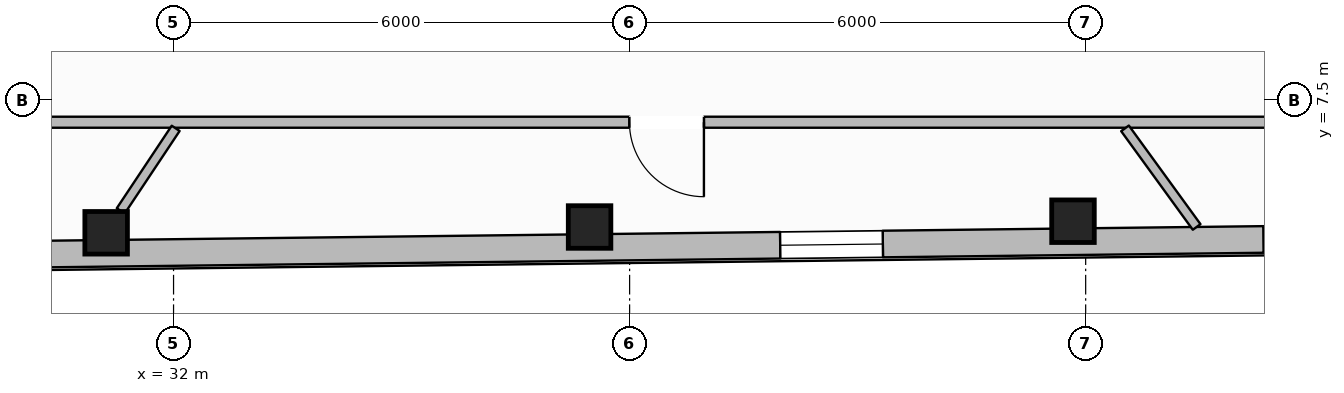
"""IFC4 building model, lengths in metres.
Left out: names, types, materials, properties, quantities, classifications, styles, units other than length and angle.
Written with IfcOpenShell. Run it as: python <this file> out.ifc"""

import sys

from ifc_helpers import new_model, si_unit, direction, frame, frame_2d, origin, origin_2d, place, context, subcontext, project, spatial, rectangle, hollow_rectangle, extrude, element, fill, save


model = new_model("IFC4")
c1 = context("Model", 3, precision=1e-05, world=origin(), true_north=direction((0.0, 1.0)))
c2 = subcontext(c1, "Body", "Model", "MODEL_VIEW")
j1 = project(units=[si_unit("LENGTHUNIT", "METRE"), si_unit("PLANEANGLEUNIT", "RADIAN")], contexts=[c1])
p1 = place(None, origin())
s1 = spatial("IfcSite", under=j1, at=p1, CompositionType="ELEMENT")
p2 = place(p1, origin())
s2 = spatial("IfcBuilding", under=s1, at=p2, CompositionType="ELEMENT")
p3 = place(p2, frame((0.0, 0.0, 289.55)))
s3 = spatial("IfcBuildingStorey", under=s2, at=p3, CompositionType="ELEMENT", Elevation=289.55)
for number, where, z_axis, x_axis in (
    (1, (31.113, 5.755, 0.0), (0.0, 0.0, 1.0), (1.0, 0.0, 0.0)),
    (2, (37.473, 5.832, 0.0), (0.0, 0.0, 1.0), (1.0, 0.0, 0.0)),
    (3, (43.833, 5.908, 0.0), (0.0, 0.0, 1.0), (1.0, 0.0, 0.0)),
):
    element("IfcColumn", number, at=place(p3, frame(where, z_axis=z_axis, x_axis=x_axis)), inside=s3, PredefinedType="COLUMN", context=c2, shape_type="SweptSolid", body=[
        extrude(hollow_rectangle(XDim=0.56, YDim=0.56, WallThickness=0.025, at=origin_2d()), origin(), (0.0, 0.0, 1.0), 3.61),
    ])
p4 = place(p3, frame((57.028, 5.796, 0.0), z_axis=(0.0, 0.0, 1.0), x_axis=(-0.999928125145, -0.011989351295, 0.0)))
e4 = element("IfcWall", 4, at=p4, inside=s3, PredefinedType="STANDARD", context=c2, shape_type="SweptSolid", body=[
    extrude(rectangle(XDim=39.118, YDim=0.35, at=frame_2d((19.559, 0.0))), origin(), (0.0, 0.0, 1.0), 3.196),
])
p5 = place(p4, frame((34.779, 0.0, 0.65)))
e5 = element("IfcOpeningElement", 5, at=p5, cuts=e4, PredefinedType="OPENING", context=c2, shape_type="SweptSolid", body=[
    extrude(rectangle(XDim=1.35, YDim=1.75, at=frame_2d((0.675, 0.875))), frame((0.0, 0.185, 0.0), z_axis=(0.0, -1.0, 0.0), x_axis=(1.0, 0.0, 0.0)), (0.0, 0.0, 1.0), 0.37),
])
p6 = place(p4, frame((28.419, 0.0, 0.65)))
e6 = element("IfcOpeningElement", 6, at=p6, cuts=e4, PredefinedType="OPENING", context=c2, shape_type="SweptSolid", body=[
    extrude(rectangle(XDim=1.35, YDim=1.75, at=frame_2d((0.675, 0.875))), frame((0.0, 0.185, 0.0), z_axis=(0.0, -1.0, 0.0), x_axis=(1.0, 0.0, 0.0)), (0.0, 0.0, 1.0), 0.37),
])
p7 = place(p4, frame((15.698, 0.0, 0.65)))
e7 = element("IfcOpeningElement", 7, at=p7, cuts=e4, PredefinedType="OPENING", context=c2, shape_type="SweptSolid", body=[
    extrude(rectangle(XDim=1.35, YDim=1.75, at=frame_2d((0.675, 0.875))), frame((0.0, 0.185, 0.0), z_axis=(0.0, -1.0, 0.0), x_axis=(1.0, 0.0, 0.0)), (0.0, 0.0, 1.0), 0.37),
])
p8 = place(p4, frame((9.337, 0.0, 0.65)))
e8 = element("IfcOpeningElement", 8, at=p8, cuts=e4, PredefinedType="OPENING", context=c2, shape_type="SweptSolid", body=[
    extrude(rectangle(XDim=1.35, YDim=1.75, at=frame_2d((0.675, 0.875))), frame((0.0, 0.185, 0.0), z_axis=(0.0, -1.0, 0.0), x_axis=(1.0, 0.0, 0.0)), (0.0, 0.0, 1.0), 0.37),
])
p9 = place(p4, frame((2.977, 0.0, 0.65)))
e9 = element("IfcOpeningElement", 9, at=p9, cuts=e4, PredefinedType="OPENING", context=c2, shape_type="SweptSolid", body=[
    extrude(rectangle(XDim=1.35, YDim=1.75, at=frame_2d((0.675, 0.875))), frame((0.0, 0.185, 0.0), z_axis=(0.0, -1.0, 0.0), x_axis=(1.0, 0.0, 0.0)), (0.0, 0.0, 1.0), 0.37),
])
p10 = place(p3, frame((49.91, 7.21, 0.0), z_axis=(0.0, 0.0, 1.0), x_axis=(-1.0, 0.0, 0.0)))
e10 = element("IfcWall", 10, at=p10, inside=s3, PredefinedType="PARTITIONING", context=c2, shape_type="SweptSolid", body=[
    extrude(rectangle(XDim=23.82, YDim=0.145, at=frame_2d((11.91, 0.0))), origin(), (0.0, 0.0, 1.0), 3.349),
])
p11 = place(p10, frame((10.932, 0.0, 0.0)))
e11 = element("IfcOpeningElement", 11, at=p11, cuts=e10, PredefinedType="OPENING", context=c2, shape_type="SweptSolid", body=[
    extrude(rectangle(XDim=0.98, YDim=2.15, at=frame_2d((0.49, 1.075))), frame((0.0, 0.083, 0.0), z_axis=(0.0, -1.0, 0.0), x_axis=(1.0, 0.0, 0.0)), (0.0, 0.0, 1.0), 0.165),
])
p12 = place(p10, frame((2.086, 0.0, 0.0)))
e12 = element("IfcOpeningElement", 12, at=p12, cuts=e10, PredefinedType="OPENING", context=c2, shape_type="SweptSolid", body=[
    extrude(rectangle(XDim=0.98, YDim=2.15, at=frame_2d((0.49, 1.075))), frame((0.0, 0.083, 0.0), z_axis=(0.0, -1.0, 0.0), x_axis=(1.0, 0.0, 0.0)), (0.0, 0.0, 1.0), 0.165),
])
p13 = place(p3, frame((32.028, 7.129, 0.0), z_axis=(0.0, 0.0, 1.0), x_axis=(-0.554181973297, -0.83239554328, 0.0)))
e13 = element("IfcWall", 13, at=p13, inside=s3, PredefinedType="PARTITIONING", context=c2, shape_type="SweptSolid", body=[
    extrude(rectangle(XDim=1.305, YDim=0.125, at=frame_2d((0.652, 0.0))), origin(), (0.0, 0.0, 1.0), 3.61),
])
p14 = place(p3, frame((44.518, 7.129, 0.0), z_axis=(0.0, 0.0, 1.0), x_axis=(0.587773247584, -0.80902571617, 0.0)))
e14 = element("IfcWall", 14, at=p14, inside=s3, PredefinedType="PARTITIONING", context=c2, shape_type="SweptSolid", body=[
    extrude(rectangle(XDim=1.603, YDim=0.125, at=frame_2d((0.802, 0.0))), origin(), (0.0, 0.0, 1.0), 3.61),
])
p15 = place(p7, origin())
e15 = element("IfcWindow", 15, at=p15, inside=s3, PartitioningType="SINGLE_PANEL", PredefinedType="WINDOW", context=c2, shape_type="SweptSolid", body=[
    extrude(rectangle(XDim=1.35, YDim=1.75, at=frame_2d((0.675, 0.875))), frame((0.0, 0.03, 0.0), z_axis=(0.0, -1.0, 0.0), x_axis=(1.0, 0.0, 0.0)), (0.0, 0.0, 1.0), 0.06),
])
fill(e7, e15)
p16 = place(p8, origin())
e16 = element("IfcWindow", 16, at=p16, inside=s3, PartitioningType="SINGLE_PANEL", PredefinedType="WINDOW", context=c2, shape_type="SweptSolid", body=[
    extrude(rectangle(XDim=1.35, YDim=1.75, at=frame_2d((0.675, 0.875))), frame((0.0, 0.03, 0.0), z_axis=(0.0, -1.0, 0.0), x_axis=(1.0, 0.0, 0.0)), (0.0, 0.0, 1.0), 0.06),
])
fill(e8, e16)
p17 = place(p11, origin())
e17 = element("IfcDoor", 17, at=p17, inside=s3, OperationType="SINGLE_SWING_LEFT", PredefinedType="DOOR", context=c2, shape_type="SweptSolid", body=[
    extrude(rectangle(XDim=0.98, YDim=2.15, at=frame_2d((0.49, 1.075))), frame((0.0, 0.025, 0.0), z_axis=(0.0, -1.0, 0.0), x_axis=(1.0, 0.0, 0.0)), (0.0, 0.0, 1.0), 0.05),
])
fill(e11, e17)
save(model, sys.argv[1])
